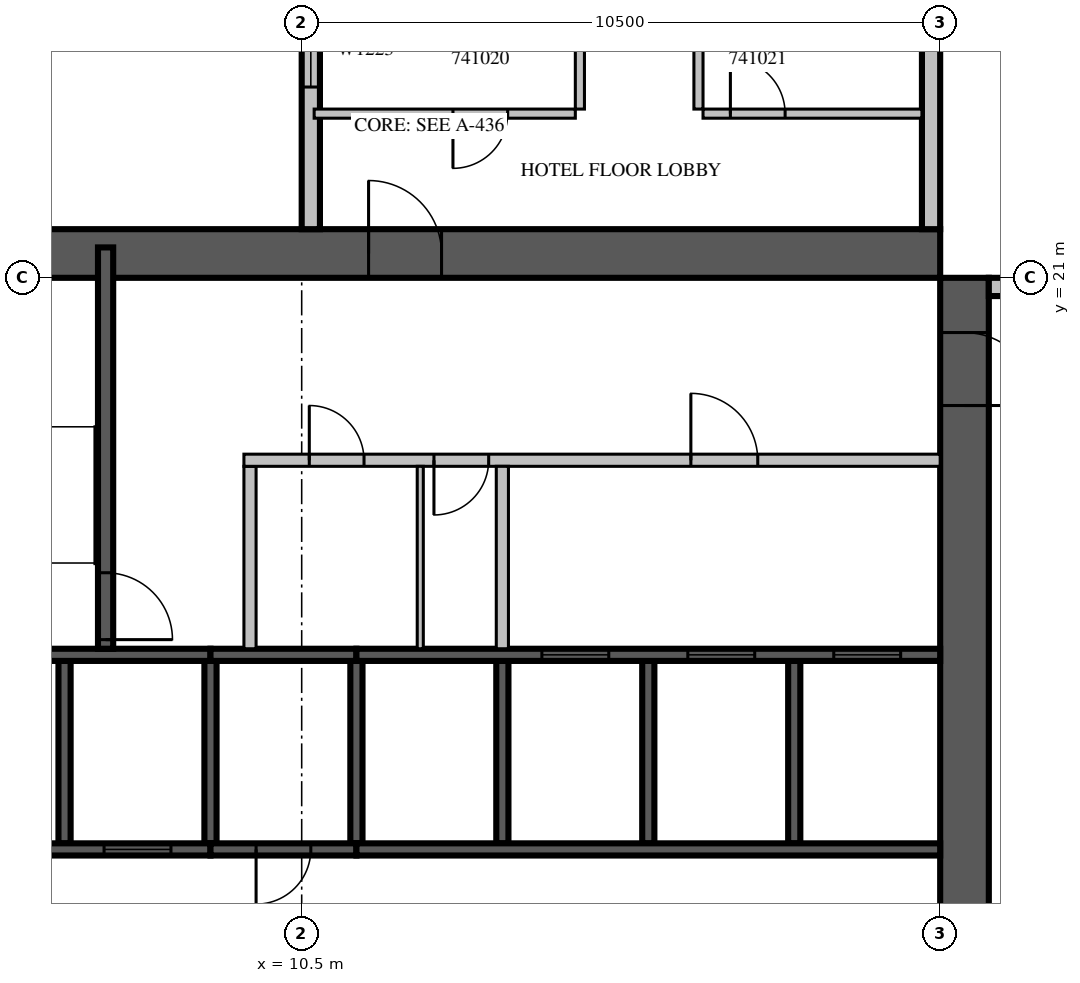
"""IFC4 building model, lengths in metres.
Left out: names, types, materials, properties, quantities, classifications, styles, units other than length and angle.
Written with IfcOpenShell. Run it as: python <this file> out.ifc"""

import sys

from ifc_helpers import new_model, si_unit, direction, frame, frame_2d, origin, place, context, subcontext, project, spatial, rectangle, extrude, source, transform, mapped, element, fill, save


model = new_model("IFC4")
c1 = context("Model", 3, precision=1e-05, world=origin(), true_north=direction((0.0, 1.0)))
c2 = subcontext(c1, "Body", "Model", "MODEL_VIEW")
j1 = project(units=[si_unit("LENGTHUNIT", "METRE"), si_unit("PLANEANGLEUNIT", "RADIAN")], contexts=[c1])
p1 = place(None, origin())
s1 = spatial("IfcSite", under=j1, at=p1, CompositionType="ELEMENT")
p2 = place(p1, origin())
s2 = spatial("IfcBuilding", under=s1, at=p2, CompositionType="ELEMENT")
p3 = place(p2, frame((0.0, 0.0, 189.2)))
s3 = spatial("IfcBuildingStorey", under=s2, at=p3, CompositionType="ELEMENT", Elevation=189.2)
m1 = source(origin(), c2, "Body", "SweptSolid", [
    extrude(rectangle(XDim=16.8, YDim=0.8, at=frame_2d((8.4, 0.0))), origin(), (0.0, 0.0, 1.0), 3.8),
])
p4 = place(p3, frame((21.4, 4.2, 0.0), z_axis=(0.0, 0.0, 1.0), x_axis=(0.0, 1.0, 0.0)))
e1 = element("IfcWall", 1, at=p4, inside=s3, PredefinedType="SHEAR", context=c2, shape_type="MappedRepresentation", body=[
    mapped(m1, transform((0.0, 0.0, 0.0), scale=1.0)),
])
m2 = source(origin(), c2, "Body", "SweptSolid", [
    extrude(rectangle(XDim=2.2, YDim=2.1, at=frame_2d((1.1, 1.05))), frame((0.0, 0.41, 0.0), z_axis=(0.0, -1.0, 0.0), x_axis=(1.0, 0.0, 0.0)), (0.0, 0.0, 1.0), 0.82),
])
p5 = place(p4, frame((4.2, 0.0, 0.0)))
e2 = element("IfcOpeningElement", 2, at=p5, cuts=e1, PredefinedType="OPENING", context=c2, shape_type="MappedRepresentation", body=[
    mapped(m2, transform((0.0, 0.0, 0.0), scale=1.0)),
])
m3 = source(origin(), c2, "Body", "SweptSolid", [
    extrude(rectangle(XDim=1.2, YDim=2.1, at=frame_2d((0.6, 1.05))), frame((0.0, 0.41, 0.0), z_axis=(0.0, -1.0, 0.0), x_axis=(1.0, 0.0, 0.0)), (0.0, 0.0, 1.0), 0.82),
])
p6 = place(p4, frame((14.7, 0.0, 0.0)))
e3 = element("IfcOpeningElement", 3, at=p6, cuts=e1, PredefinedType="OPENING", context=c2, shape_type="MappedRepresentation", body=[
    mapped(m3, transform((0.0, 0.0, 0.0), scale=1.0)),
])
p7 = place(p3, frame((4.2, 21.4, 0.0), z_axis=(0.0, 0.0, 1.0), x_axis=(1.0, 0.0, 0.0)))
e4 = element("IfcWall", 4, at=p7, inside=s3, PredefinedType="SHEAR", context=c2, shape_type="MappedRepresentation", body=[
    mapped(m1, transform((0.0, 0.0, 0.0), scale=1.0)),
])
p8 = place(p7, frame((7.4, 0.0, 0.0)))
e5 = element("IfcOpeningElement", 5, at=p8, cuts=e4, PredefinedType="OPENING", context=c2, shape_type="MappedRepresentation", body=[
    mapped(m3, transform((0.0, 0.0, 0.0), scale=1.0)),
])
m4 = source(origin(), c2, "Body", "SweptSolid", [
    extrude(rectangle(XDim=7.15, YDim=0.3, at=frame_2d((3.575, 0.0))), origin(), (0.0, 0.0, 1.0), 3.4),
])
p9 = place(p3, frame((28.95, 20.85, 0.0), z_axis=(0.0, 0.0, 1.0), x_axis=(-1.0, 0.0, 0.0)))
e6 = element("IfcWall", 6, at=p9, inside=s3, PredefinedType="STANDARD", context=c2, shape_type="MappedRepresentation", body=[
    mapped(m4, transform((0.0, 0.0, 0.0), scale=1.0)),
])
m5 = source(origin(), c2, "Body", "SweptSolid", [
    extrude(rectangle(XDim=3.0, YDim=2.3, at=frame_2d((1.5, 1.15))), frame((0.0, 0.16, 0.0), z_axis=(0.0, -1.0, 0.0), x_axis=(1.0, 0.0, 0.0)), (0.0, 0.0, 1.0), 0.32),
])
p10 = place(p9, frame((0.15, 0.0, 0.6)))
e7 = element("IfcOpeningElement", 7, at=p10, cuts=e6, PredefinedType="OPENING", context=c2, shape_type="MappedRepresentation", body=[
    mapped(m5, transform((0.0, 0.0, 0.0), scale=1.0)),
])
p11 = place(p3, frame((20.85, 21.8, 0.0), z_axis=(0.0, 0.0, 1.0), x_axis=(0.0, 1.0, 0.0)))
e8 = element("IfcWall", 8, at=p11, inside=s3, PredefinedType="STANDARD", context=c2, shape_type="MappedRepresentation", body=[
    mapped(m4, transform((0.0, 0.0, 0.0), scale=1.0)),
])
p12 = place(p11, frame((4.0, 0.0, 0.6)))
e9 = element("IfcOpeningElement", 9, at=p12, cuts=e8, PredefinedType="OPENING", context=c2, shape_type="MappedRepresentation", body=[
    mapped(m5, transform((0.0, 0.0, 0.0), scale=1.0)),
])
p13 = place(p3, frame((10.65, 28.95, 0.0), z_axis=(0.0, 0.0, 1.0), x_axis=(0.0, -1.0, 0.0)))
e10 = element("IfcWall", 10, at=p13, inside=s3, PredefinedType="STANDARD", context=c2, shape_type="MappedRepresentation", body=[
    mapped(m4, transform((0.0, 0.0, 0.0), scale=1.0)),
])
m6 = source(origin(), c2, "Body", "SweptSolid", [
    extrude(rectangle(XDim=1.8, YDim=2.3, at=frame_2d((0.9, 1.15))), frame((0.0, 0.16, 0.0), z_axis=(0.0, -1.0, 0.0), x_axis=(1.0, 0.0, 0.0)), (0.0, 0.0, 1.0), 0.32),
])
p14 = place(p13, frame((0.15, 0.0, 0.6)))
e11 = element("IfcOpeningElement", 11, at=p14, cuts=e10, PredefinedType="OPENING", context=c2, shape_type="MappedRepresentation", body=[
    mapped(m6, transform((0.0, 0.0, 0.0), scale=1.0)),
])
m7 = source(origin(), c2, "Body", "SweptSolid", [
    extrude(rectangle(XDim=1.2, YDim=2.3, at=frame_2d((0.6, 1.15))), frame((0.0, 0.16, 0.0), z_axis=(0.0, -1.0, 0.0), x_axis=(1.0, 0.0, 0.0)), (0.0, 0.0, 1.0), 0.32),
])
p15 = place(p13, frame((3.612, 0.0, 0.6)))
e12 = element("IfcOpeningElement", 12, at=p15, cuts=e10, PredefinedType="OPENING", context=c2, shape_type="MappedRepresentation", body=[
    mapped(m7, transform((0.0, 0.0, 0.0), scale=1.0)),
])
m8 = source(origin(), c2, "Body", "SweptSolid", [
    extrude(rectangle(XDim=3.0, YDim=0.2, at=frame_2d((1.5, 0.0))), origin(), (0.0, 0.0, 1.0), 3.8),
])
p16 = place(p3, frame((6.6, 11.7, 0.0), z_axis=(0.0, 0.0, 1.0), x_axis=(0.0, 1.0, 0.0)))
e13 = element("IfcWall", 13, at=p16, inside=s3, PredefinedType="SOLIDWALL", context=c2, shape_type="MappedRepresentation", body=[
    mapped(m8, transform((0.0, 0.0, 0.0), scale=1.0)),
])
m9 = source(origin(), c2, "Body", "SweptSolid", [
    extrude(rectangle(XDim=3.0, YDim=0.2, at=frame_2d((1.5, 0.0))), origin(), (0.0, 0.0, 1.0), 3.4),
])
for number, where, z_axis, x_axis in (
    (14, (9.0, 11.7, 0.0), (0.0, 0.0, 1.0), (0.0, 1.0, 0.0)),
    (15, (11.4, 11.7, 0.0), (0.0, 0.0, 1.0), (0.0, 1.0, 0.0)),
):
    element("IfcWall", number, at=place(p3, frame(where, z_axis=z_axis, x_axis=x_axis)), inside=s3, PredefinedType="SOLIDWALL", context=c2, shape_type="MappedRepresentation", body=[
        mapped(m9, transform((0.0, 0.0, 0.0), scale=1.0)),
    ])
for number, where, z_axis, x_axis in (
    (16, (13.8, 11.7, 0.0), (0.0, 0.0, 1.0), (0.0, 1.0, 0.0)),
    (17, (16.2, 11.7, 0.0), (0.0, 0.0, 1.0), (0.0, 1.0, 0.0)),
    (18, (18.6, 11.7, 0.0), (0.0, 0.0, 1.0), (0.0, 1.0, 0.0)),
):
    element("IfcWall", number, at=place(p3, frame(where, z_axis=z_axis, x_axis=x_axis)), inside=s3, PredefinedType="SOLIDWALL", context=c2, shape_type="MappedRepresentation", body=[
        mapped(m8, transform((0.0, 0.0, 0.0), scale=1.0)),
    ])
m10 = source(origin(), c2, "Body", "SweptSolid", [
    extrude(rectangle(XDim=4.8, YDim=0.2, at=frame_2d((2.4, 0.0))), origin(), (0.0, 0.0, 1.0), 3.8),
])
p17 = place(p3, frame((4.2, 11.6, 0.0), z_axis=(0.0, 0.0, 1.0), x_axis=(1.0, 0.0, 0.0)))
e19 = element("IfcWall", 19, at=p17, inside=s3, PredefinedType="SOLIDWALL", context=c2, shape_type="MappedRepresentation", body=[
    mapped(m10, transform((0.0, 0.0, 0.0), scale=1.0)),
])
m11 = source(origin(), c2, "Body", "SweptSolid", [
    extrude(rectangle(XDim=1.1, YDim=2.1, at=frame_2d((0.55, 1.05))), frame((0.0, 0.11, 0.0), z_axis=(0.0, -1.0, 0.0), x_axis=(1.0, 0.0, 0.0)), (0.0, 0.0, 1.0), 0.22),
])
p18 = place(p17, frame((0.65, 0.0, 0.0)))
e20 = element("IfcOpeningElement", 20, at=p18, cuts=e19, PredefinedType="OPENING", context=c2, shape_type="MappedRepresentation", body=[
    mapped(m11, transform((0.0, 0.0, 0.0), scale=1.0)),
])
p19 = place(p17, frame((3.05, 0.0, 0.0)))
e21 = element("IfcOpeningElement", 21, at=p19, cuts=e19, PredefinedType="OPENING", context=c2, shape_type="MappedRepresentation", body=[
    mapped(m11, transform((0.0, 0.0, 0.0), scale=1.0)),
])
m12 = source(origin(), c2, "Body", "SweptSolid", [
    extrude(rectangle(XDim=2.4, YDim=0.2, at=frame_2d((1.2, 0.0))), origin(), (0.0, 0.0, 1.0), 3.4),
])
p20 = place(p3, frame((9.0, 11.6, 0.0), z_axis=(0.0, 0.0, 1.0), x_axis=(1.0, 0.0, 0.0)))
e22 = element("IfcWall", 22, at=p20, inside=s3, PredefinedType="SOLIDWALL", context=c2, shape_type="MappedRepresentation", body=[
    mapped(m12, transform((0.0, 0.0, 0.0), scale=1.0)),
])
m13 = source(origin(), c2, "Body", "SweptSolid", [
    extrude(rectangle(XDim=0.9, YDim=2.1, at=frame_2d((0.45, 1.05))), frame((0.0, 0.11, 0.0), z_axis=(0.0, -1.0, 0.0), x_axis=(1.0, 0.0, 0.0)), (0.0, 0.0, 1.0), 0.22),
])
p21 = place(p20, frame((0.75, 0.0, 0.0)))
e23 = element("IfcOpeningElement", 23, at=p21, cuts=e22, PredefinedType="OPENING", context=c2, shape_type="MappedRepresentation", body=[
    mapped(m13, transform((0.0, 0.0, 0.0), scale=1.0)),
])
m14 = source(origin(), c2, "Body", "SweptSolid", [
    extrude(rectangle(XDim=9.6, YDim=0.2, at=frame_2d((4.8, 0.0))), origin(), (0.0, 0.0, 1.0), 3.8),
])
p22 = place(p3, frame((11.4, 11.6, 0.0), z_axis=(0.0, 0.0, 1.0), x_axis=(1.0, 0.0, 0.0)))
e24 = element("IfcWall", 24, at=p22, inside=s3, PredefinedType="SOLIDWALL", context=c2, shape_type="MappedRepresentation", body=[
    mapped(m14, transform((0.0, 0.0, 0.0), scale=1.0)),
])
p23 = place(p3, frame((4.2, 14.8, 0.0), z_axis=(0.0, 0.0, 1.0), x_axis=(1.0, 0.0, 0.0)))
e25 = element("IfcWall", 25, at=p23, inside=s3, PredefinedType="SOLIDWALL", context=c2, shape_type="MappedRepresentation", body=[
    mapped(m10, transform((0.0, 0.0, 0.0), scale=1.0)),
])
p24 = place(p3, frame((9.0, 14.8, 0.0), z_axis=(0.0, 0.0, 1.0), x_axis=(1.0, 0.0, 0.0)))
e26 = element("IfcWall", 26, at=p24, inside=s3, PredefinedType="SOLIDWALL", context=c2, shape_type="MappedRepresentation", body=[
    mapped(m12, transform((0.0, 0.0, 0.0), scale=1.0)),
])
p25 = place(p3, frame((11.4, 14.8, 0.0), z_axis=(0.0, 0.0, 1.0), x_axis=(1.0, 0.0, 0.0)))
e27 = element("IfcWall", 27, at=p25, inside=s3, PredefinedType="SOLIDWALL", context=c2, shape_type="MappedRepresentation", body=[
    mapped(m14, transform((0.0, 0.0, 0.0), scale=1.0)),
])
p26 = place(p25, frame((3.05, 0.0, 0.0)))
e28 = element("IfcOpeningElement", 28, at=p26, cuts=e27, PredefinedType="OPENING", context=c2, shape_type="MappedRepresentation", body=[
    mapped(m11, transform((0.0, 0.0, 0.0), scale=1.0)),
])
p27 = place(p25, frame((5.45, 0.0, 0.0)))
e29 = element("IfcOpeningElement", 29, at=p27, cuts=e27, PredefinedType="OPENING", context=c2, shape_type="MappedRepresentation", body=[
    mapped(m11, transform((0.0, 0.0, 0.0), scale=1.0)),
])
p28 = place(p25, frame((7.85, 0.0, 0.0)))
e30 = element("IfcOpeningElement", 30, at=p28, cuts=e27, PredefinedType="OPENING", context=c2, shape_type="MappedRepresentation", body=[
    mapped(m11, transform((0.0, 0.0, 0.0), scale=1.0)),
])
m15 = source(origin(), c2, "Body", "SweptSolid", [
    extrude(rectangle(XDim=6.6, YDim=0.25, at=frame_2d((3.3, 0.0))), origin(), (0.0, 0.0, 1.0), 3.4),
])
p29 = place(p3, frame((7.275, 14.9, 0.0), z_axis=(0.0, 0.0, 1.0), x_axis=(0.0, 1.0, 0.0)))
e31 = element("IfcWall", 31, at=p29, inside=s3, PredefinedType="SOLIDWALL", context=c2, shape_type="MappedRepresentation", body=[
    mapped(m15, transform((0.0, 0.0, 0.0), scale=1.0)),
])
m16 = source(origin(), c2, "Body", "SweptSolid", [
    extrude(rectangle(XDim=1.1, YDim=2.1, at=frame_2d((0.55, 1.05))), frame((0.0, 0.135, 0.0), z_axis=(0.0, -1.0, 0.0), x_axis=(1.0, 0.0, 0.0)), (0.0, 0.0, 1.0), 0.27),
])
p30 = place(p29, frame((0.15, 0.0, 0.0)))
e32 = element("IfcOpeningElement", 32, at=p30, cuts=e31, PredefinedType="OPENING", context=c2, shape_type="MappedRepresentation", body=[
    mapped(m16, transform((0.0, 0.0, 0.0), scale=1.0)),
])
m17 = source(origin(), c2, "Body", "SweptSolid", [
    extrude(rectangle(XDim=3.0, YDim=0.2, at=frame_2d((1.5, 0.0))), origin(), (0.0, 0.0, 1.0), 3.4),
])
p31 = place(p3, frame((9.65, 14.9, 0.0), z_axis=(0.0, 0.0, 1.0), x_axis=(0.0, 1.0, 0.0)))
e33 = element("IfcWall", 33, at=p31, inside=s3, PredefinedType="PARTITIONING", context=c2, shape_type="MappedRepresentation", body=[
    mapped(m17, transform((0.0, 0.0, 0.0), scale=1.0)),
])
m18 = source(origin(), c2, "Body", "SweptSolid", [
    extrude(rectangle(XDim=11.45, YDim=0.2, at=frame_2d((5.725, 0.0))), origin(), (0.0, 0.0, 1.0), 3.4),
])
p32 = place(p3, frame((9.55, 18.0, 0.0), z_axis=(0.0, 0.0, 1.0), x_axis=(1.0, 0.0, 0.0)))
e34 = element("IfcWall", 34, at=p32, inside=s3, PredefinedType="PARTITIONING", context=c2, shape_type="MappedRepresentation", body=[
    mapped(m18, transform((0.0, 0.0, 0.0), scale=1.0)),
])
p33 = place(p32, frame((1.075, 0.0, 0.0)))
e35 = element("IfcOpeningElement", 35, at=p33, cuts=e34, PredefinedType="OPENING", context=c2, shape_type="MappedRepresentation", body=[
    mapped(m13, transform((0.0, 0.0, 0.0), scale=1.0)),
])
p34 = place(p32, frame((3.125, 0.0, 0.0)))
e36 = element("IfcOpeningElement", 36, at=p34, cuts=e34, PredefinedType="OPENING", context=c2, shape_type="MappedRepresentation", body=[
    mapped(m13, transform((0.0, 0.0, 0.0), scale=1.0)),
])
p35 = place(p32, frame((7.35, 0.0, 0.0)))
e37 = element("IfcOpeningElement", 37, at=p35, cuts=e34, PredefinedType="OPENING", context=c2, shape_type="MappedRepresentation", body=[
    mapped(m11, transform((0.0, 0.0, 0.0), scale=1.0)),
])
p36 = place(p3, frame((13.8, 14.9, 0.0), z_axis=(0.0, 0.0, 1.0), x_axis=(0.0, 1.0, 0.0)))
e38 = element("IfcWall", 38, at=p36, inside=s3, PredefinedType="PARTITIONING", context=c2, shape_type="MappedRepresentation", body=[
    mapped(m17, transform((0.0, 0.0, 0.0), scale=1.0)),
])
m19 = source(origin(), c2, "Body", "SweptSolid", [
    extrude(rectangle(XDim=3.0, YDim=0.1, at=frame_2d((1.5, 0.0))), origin(), (0.0, 0.0, 1.0), 3.4),
])
p37 = place(p3, frame((12.45, 14.9, 0.0), z_axis=(0.0, 0.0, 1.0), x_axis=(0.0, 1.0, 0.0)))
e39 = element("IfcWall", 39, at=p37, inside=s3, PredefinedType="PARTITIONING", context=c2, shape_type="MappedRepresentation", body=[
    mapped(m19, transform((0.0, 0.0, 0.0), scale=1.0)),
])
m20 = source(origin(), c2, "Body", "SweptSolid", [
    extrude(rectangle(XDim=4.295, YDim=0.15, at=frame_2d((2.147, 0.0))), origin(), (0.0, 0.0, 1.0), 3.4),
])
p38 = place(p3, frame((10.705, 23.7, 0.0), z_axis=(0.0, 0.0, 1.0), x_axis=(1.0, 0.0, 0.0)))
e40 = element("IfcWall", 40, at=p38, inside=s3, PredefinedType="PARTITIONING", context=c2, shape_type="MappedRepresentation", body=[
    mapped(m20, transform((0.0, 0.0, 0.0), scale=1.0)),
])
m21 = source(origin(), c2, "Body", "SweptSolid", [
    extrude(rectangle(XDim=0.9, YDim=2.1, at=frame_2d((0.45, 1.05))), frame((0.0, 0.085, 0.0), z_axis=(0.0, -1.0, 0.0), x_axis=(1.0, 0.0, 0.0)), (0.0, 0.0, 1.0), 0.17),
])
p39 = place(p38, frame((2.283, 0.0, 0.0)))
e41 = element("IfcOpeningElement", 41, at=p39, cuts=e40, PredefinedType="OPENING", context=c2, shape_type="MappedRepresentation", body=[
    mapped(m21, transform((0.0, 0.0, 0.0), scale=1.0)),
])
m22 = source(origin(), c2, "Body", "SweptSolid", [
    extrude(rectangle(XDim=3.6, YDim=0.15, at=frame_2d((1.8, 0.0))), origin(), (0.0, 0.0, 1.0), 3.4),
])
p40 = place(p3, frame((17.1, 23.7, 0.0), z_axis=(0.0, 0.0, 1.0), x_axis=(1.0, 0.0, 0.0)))
e42 = element("IfcWall", 42, at=p40, inside=s3, PredefinedType="PARTITIONING", context=c2, shape_type="MappedRepresentation", body=[
    mapped(m22, transform((0.0, 0.0, 0.0), scale=1.0)),
])
p41 = place(p40, frame((0.45, 0.0, 0.0)))
e43 = element("IfcOpeningElement", 43, at=p41, cuts=e42, PredefinedType="OPENING", context=c2, shape_type="MappedRepresentation", body=[
    mapped(m21, transform((0.0, 0.0, 0.0), scale=1.0)),
])
m23 = source(origin(), c2, "Body", "SweptSolid", [
    extrude(rectangle(XDim=5.55, YDim=0.15, at=frame_2d((2.775, 0.0))), origin(), (0.0, 0.0, 1.0), 3.4),
])
for number, where, z_axis, x_axis in (
    (44, (15.075, 23.775, 0.0), (0.0, 0.0, 1.0), (0.0, 1.0, 0.0)),
    (45, (17.025, 29.325, 0.0), (0.0, 0.0, 1.0), (0.0, -1.0, 0.0)),
):
    element("IfcWall", number, at=place(p3, frame(where, z_axis=z_axis, x_axis=x_axis)), inside=s3, PredefinedType="PARTITIONING", context=c2, shape_type="MappedRepresentation", body=[
        mapped(m23, transform((0.0, 0.0, 0.0), scale=1.0)),
    ])
m24 = source(origin(), c2, "Body", "SweptSolid", [
    extrude(rectangle(XDim=1.2, YDim=2.3, at=frame_2d((0.6, 1.15))), frame((0.0, 0.03, 0.0), z_axis=(0.0, -1.0, 0.0), x_axis=(1.0, 0.0, 0.0)), (0.0, 0.0, 1.0), 0.06),
])
p42 = place(p15, origin())
e46 = element("IfcWindow", 46, at=p42, inside=s3, PartitioningType="SINGLE_PANEL", PredefinedType="WINDOW", context=c2, shape_type="MappedRepresentation", body=[
    mapped(m24, transform((0.0, 0.0, 0.0), scale=1.0)),
])
fill(e12, e46)
m25 = source(origin(), c2, "Body", "SweptSolid", [
    extrude(rectangle(XDim=1.1, YDim=2.1, at=frame_2d((0.55, 1.05))), frame((0.0, 0.025, 0.0), z_axis=(0.0, -1.0, 0.0), x_axis=(1.0, 0.0, 0.0)), (0.0, 0.0, 1.0), 0.05),
])
p43 = place(p19, origin())
e47 = element("IfcDoor", 47, at=p43, inside=s3, OperationType="SLIDING_TO_LEFT", PredefinedType="DOOR", context=c2, shape_type="MappedRepresentation", body=[
    mapped(m25, transform((0.0, 0.0, 0.0), scale=1.0)),
])
fill(e21, e47)
m26 = source(origin(), c2, "Body", "SweptSolid", [
    extrude(rectangle(XDim=0.9, YDim=2.1, at=frame_2d((0.45, 1.05))), frame((0.0, 0.025, 0.0), z_axis=(0.0, -1.0, 0.0), x_axis=(1.0, 0.0, 0.0)), (0.0, 0.0, 1.0), 0.05),
])
p44 = place(p21, origin())
e48 = element("IfcDoor", 48, at=p44, inside=s3, OperationType="SINGLE_SWING_RIGHT", PredefinedType="DOOR", context=c2, shape_type="MappedRepresentation", body=[
    mapped(m26, transform((0.0, 0.0, 0.0), scale=1.0)),
])
fill(e23, e48)
p45 = place(p26, origin())
e49 = element("IfcDoor", 49, at=p45, inside=s3, OperationType="SLIDING_TO_LEFT", PredefinedType="DOOR", context=c2, shape_type="MappedRepresentation", body=[
    mapped(m25, transform((0.0, 0.0, 0.0), scale=1.0)),
])
fill(e28, e49)
p46 = place(p27, origin())
e50 = element("IfcDoor", 50, at=p46, inside=s3, OperationType="SLIDING_TO_LEFT", PredefinedType="DOOR", context=c2, shape_type="MappedRepresentation", body=[
    mapped(m25, transform((0.0, 0.0, 0.0), scale=1.0)),
])
fill(e29, e50)
p47 = place(p28, origin())
e51 = element("IfcDoor", 51, at=p47, inside=s3, OperationType="SLIDING_TO_LEFT", PredefinedType="DOOR", context=c2, shape_type="MappedRepresentation", body=[
    mapped(m25, transform((0.0, 0.0, 0.0), scale=1.0)),
])
fill(e30, e51)
p48 = place(p30, origin())
e52 = element("IfcDoor", 52, at=p48, inside=s3, OperationType="SINGLE_SWING_RIGHT", PredefinedType="DOOR", context=c2, shape_type="MappedRepresentation", body=[
    mapped(m25, transform((0.0, 0.0, 0.0), scale=1.0)),
])
fill(e32, e52)
p49 = place(p33, origin())
e53 = element("IfcDoor", 53, at=p49, inside=s3, OperationType="SINGLE_SWING_LEFT", PredefinedType="DOOR", context=c2, shape_type="MappedRepresentation", body=[
    mapped(m26, transform((0.0, 0.0, 0.0), scale=1.0)),
])
fill(e35, e53)
p50 = place(p34, origin())
e54 = element("IfcDoor", 54, at=p50, inside=s3, OperationType="SINGLE_SWING_RIGHT", PredefinedType="DOOR", context=c2, shape_type="MappedRepresentation", body=[
    mapped(m26, transform((0.0, 0.0, 0.0), scale=1.0)),
])
fill(e36, e54)
p51 = place(p35, origin())
e55 = element("IfcDoor", 55, at=p51, inside=s3, OperationType="SINGLE_SWING_LEFT", PredefinedType="DOOR", context=c2, shape_type="MappedRepresentation", body=[
    mapped(m25, transform((0.0, 0.0, 0.0), scale=1.0)),
])
fill(e37, e55)
m27 = source(origin(), c2, "Body", "SweptSolid", [
    extrude(rectangle(XDim=1.2, YDim=2.1, at=frame_2d((0.6, 1.05))), frame((0.0, 0.025, 0.0), z_axis=(0.0, -1.0, 0.0), x_axis=(1.0, 0.0, 0.0)), (0.0, 0.0, 1.0), 0.05),
])
p52 = place(p8, origin())
e56 = element("IfcDoor", 56, at=p52, inside=s3, OperationType="SINGLE_SWING_LEFT", PredefinedType="DOOR", context=c2, shape_type="MappedRepresentation", body=[
    mapped(m27, transform((0.0, 0.0, 0.0), scale=1.0)),
])
fill(e5, e56)
p53 = place(p6, origin())
e57 = element("IfcDoor", 57, at=p53, inside=s3, OperationType="SINGLE_SWING_RIGHT", PredefinedType="DOOR", context=c2, shape_type="MappedRepresentation", body=[
    mapped(m27, transform((0.0, 0.0, 0.0), scale=1.0)),
])
fill(e3, e57)
p54 = place(p39, origin())
e58 = element("IfcDoor", 58, at=p54, inside=s3, OperationType="SINGLE_SWING_RIGHT", PredefinedType="DOOR", context=c2, shape_type="MappedRepresentation", body=[
    mapped(m26, transform((0.0, 0.0, 0.0), scale=1.0)),
])
fill(e41, e58)
p55 = place(p41, origin())
e59 = element("IfcDoor", 59, at=p55, inside=s3, OperationType="SINGLE_SWING_LEFT", PredefinedType="DOOR", context=c2, shape_type="MappedRepresentation", body=[
    mapped(m26, transform((0.0, 0.0, 0.0), scale=1.0)),
])
fill(e43, e59)
save(model, sys.argv[1])
